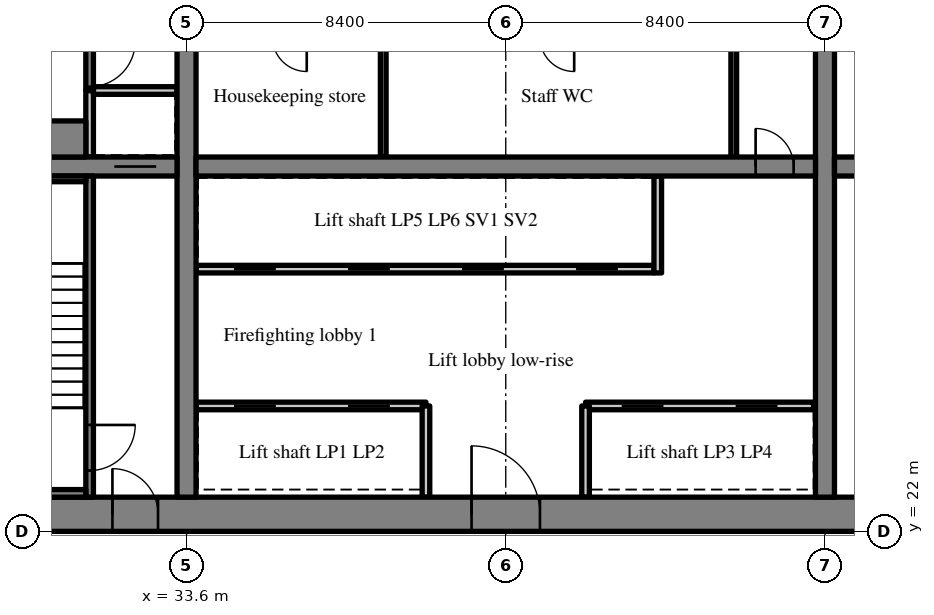
"""IFC4 building model, lengths in metres.
Left out: names, types, materials, properties, quantities, classifications, styles, units other than length and angle.
Written with IfcOpenShell. Run it as: python <this file> out.ifc"""

import sys

from ifc_helpers import new_model, si_unit, direction, frame, frame_2d, origin, place, context, subcontext, project, spatial, rectangle, extrude, source, transform, mapped, element, fill, save


model = new_model("IFC4")
c1 = context("Model", 3, precision=1e-05, world=origin(), true_north=direction((0.0, 1.0)))
c2 = subcontext(c1, "Body", "Model", "MODEL_VIEW")
j1 = project(units=[si_unit("LENGTHUNIT", "METRE"), si_unit("PLANEANGLEUNIT", "RADIAN")], contexts=[c1])
p1 = place(None, origin())
s1 = spatial("IfcSite", under=j1, at=p1, CompositionType="ELEMENT")
p2 = place(p1, origin())
s2 = spatial("IfcBuilding", under=s1, at=p2, CompositionType="ELEMENT")
p3 = place(p2, frame((0.0, 0.0, 91.4)))
s3 = spatial("IfcBuildingStorey", under=s2, at=p3, CompositionType="ELEMENT", Elevation=91.4)
m1 = source(origin(), c2, "Body", "SweptSolid", [
    extrude(rectangle(XDim=50.4, YDim=0.9, at=frame_2d((25.2, 0.0))), origin(), (0.0, 0.0, 1.0), 3.52),
])
p4 = place(p3, frame((25.2, 22.45, 0.0), z_axis=(0.0, 0.0, 1.0), x_axis=(1.0, 0.0, 0.0)))
e1 = element("IfcWall", 1, at=p4, inside=s3, PredefinedType="SHEAR", context=c2, shape_type="MappedRepresentation", body=[
    mapped(m1, transform((0.0, 0.0, 0.0), scale=1.0)),
])
m2 = source(origin(), c2, "Body", "SweptSolid", [
    extrude(rectangle(XDim=1.8, YDim=2.1, at=frame_2d((0.9, 1.05))), frame((0.0, 0.46, 0.0), z_axis=(0.0, -1.0, 0.0), x_axis=(1.0, 0.0, 0.0)), (0.0, 0.0, 1.0), 0.92),
])
p5 = place(p4, frame((15.9, 0.0, 0.0)))
e2 = element("IfcOpeningElement", 2, at=p5, cuts=e1, PredefinedType="OPENING", context=c2, shape_type="MappedRepresentation", body=[
    mapped(m2, transform((0.0, 0.0, 0.0), scale=1.0)),
])
m3 = source(origin(), c2, "Body", "SweptSolid", [
    extrude(rectangle(XDim=1.2, YDim=2.1, at=frame_2d((0.6, 1.05))), frame((0.0, 0.46, 0.0), z_axis=(0.0, -1.0, 0.0), x_axis=(1.0, 0.0, 0.0)), (0.0, 0.0, 1.0), 0.92),
])
p6 = place(p4, frame((26.975, 0.0, 0.0)))
e3 = element("IfcOpeningElement", 3, at=p6, cuts=e1, PredefinedType="OPENING", context=c2, shape_type="MappedRepresentation", body=[
    mapped(m3, transform((0.0, 0.0, 0.0), scale=1.0)),
])
m4 = source(origin(), c2, "Body", "SweptSolid", [
    extrude(rectangle(XDim=0.9, YDim=2.1, at=frame_2d((0.45, 1.05))), frame((0.0, 0.46, 0.0), z_axis=(0.0, -1.0, 0.0), x_axis=(1.0, 0.0, 0.0)), (0.0, 0.0, 1.0), 0.92),
])
p7 = place(p4, frame((34.5, 0.0, 0.0)))
e4 = element("IfcOpeningElement", 4, at=p7, cuts=e1, PredefinedType="OPENING", context=c2, shape_type="MappedRepresentation", body=[
    mapped(m4, transform((0.0, 0.0, 0.0), scale=1.0)),
])
p8 = place(p4, frame((31.5, 0.0, 0.0)))
e5 = element("IfcOpeningElement", 5, at=p8, cuts=e1, PredefinedType="OPENING", context=c2, shape_type="MappedRepresentation", body=[
    mapped(m4, transform((0.0, 0.0, 0.0), scale=1.0)),
])
p9 = place(p4, frame((39.788, 0.0, 0.0)))
e6 = element("IfcOpeningElement", 6, at=p9, cuts=e1, PredefinedType="OPENING", context=c2, shape_type="MappedRepresentation", body=[
    mapped(m4, transform((0.0, 0.0, 0.0), scale=1.0)),
])
p10 = place(p4, frame((36.762, 0.0, 0.0)))
e7 = element("IfcOpeningElement", 7, at=p10, cuts=e1, PredefinedType="OPENING", context=c2, shape_type="MappedRepresentation", body=[
    mapped(m4, transform((0.0, 0.0, 0.0), scale=1.0)),
])
p11 = place(p4, frame((6.45, 0.0, 0.0)))
e8 = element("IfcOpeningElement", 8, at=p11, cuts=e1, PredefinedType="OPENING", context=c2, shape_type="MappedRepresentation", body=[
    mapped(m3, transform((0.0, 0.0, 0.0), scale=1.0)),
])
p12 = place(p4, frame((47.775, 0.0, 0.0)))
e9 = element("IfcOpeningElement", 9, at=p12, cuts=e1, PredefinedType="OPENING", context=c2, shape_type="MappedRepresentation", body=[
    mapped(m3, transform((0.0, 0.0, 0.0), scale=1.0)),
])
m5 = source(origin(), c2, "Body", "SweptSolid", [
    extrude(rectangle(XDim=18.2, YDim=0.5, at=frame_2d((9.1, 0.0))), origin(), (0.0, 0.0, 1.0), 3.52),
])
p13 = place(p3, frame((33.6, 22.9, 0.0), z_axis=(0.0, 0.0, 1.0), x_axis=(0.0, 1.0, 0.0)))
e10 = element("IfcWall", 10, at=p13, inside=s3, PredefinedType="SHEAR", context=c2, shape_type="MappedRepresentation", body=[
    mapped(m5, transform((0.0, 0.0, 0.0), scale=1.0)),
])
m6 = source(origin(), c2, "Body", "SweptSolid", [
    extrude(rectangle(XDim=1.1, YDim=2.1, at=frame_2d((0.55, 1.05))), frame((0.0, 0.26, 0.0), z_axis=(0.0, -1.0, 0.0), x_axis=(1.0, 0.0, 0.0)), (0.0, 0.0, 1.0), 0.52),
])
p14 = place(p13, frame((12.55, 0.0, 0.0)))
e11 = element("IfcOpeningElement", 11, at=p14, cuts=e10, PredefinedType="OPENING", context=c2, shape_type="MappedRepresentation", body=[
    mapped(m6, transform((0.0, 0.0, 0.0), scale=1.0)),
])
p15 = place(p3, frame((50.4, 22.9, 0.0), z_axis=(0.0, 0.0, 1.0), x_axis=(0.0, 1.0, 0.0)))
e12 = element("IfcWall", 12, at=p15, inside=s3, PredefinedType="SHEAR", context=c2, shape_type="MappedRepresentation", body=[
    mapped(m5, transform((0.0, 0.0, 0.0), scale=1.0)),
])
p16 = place(p15, frame((12.55, 0.0, 0.0)))
e13 = element("IfcOpeningElement", 13, at=p16, cuts=e12, PredefinedType="OPENING", context=c2, shape_type="MappedRepresentation", body=[
    mapped(m6, transform((0.0, 0.0, 0.0), scale=1.0)),
])
m7 = source(origin(), c2, "Body", "SweptSolid", [
    extrude(rectangle(XDim=7.25, YDim=0.5, at=frame_2d((3.625, 0.0))), origin(), (0.0, 0.0, 1.0), 3.52),
])
p17 = place(p3, frame((26.1, 31.6, 0.0), z_axis=(0.0, 0.0, 1.0), x_axis=(1.0, 0.0, 0.0)))
e14 = element("IfcWall", 14, at=p17, inside=s3, PredefinedType="SHEAR", context=c2, shape_type="MappedRepresentation", body=[
    mapped(m7, transform((0.0, 0.0, 0.0), scale=1.0)),
])
p18 = place(p17, frame((5.6, 0.0, 0.0)))
e15 = element("IfcOpeningElement", 15, at=p18, cuts=e14, PredefinedType="OPENING", context=c2, shape_type="MappedRepresentation", body=[
    mapped(m6, transform((0.0, 0.0, 0.0), scale=1.0)),
])
m8 = source(origin(), c2, "Body", "SweptSolid", [
    extrude(rectangle(XDim=16.3, YDim=0.5, at=frame_2d((8.15, 0.0))), origin(), (0.0, 0.0, 1.0), 3.52),
])
p19 = place(p3, frame((33.85, 31.6, 0.0), z_axis=(0.0, 0.0, 1.0), x_axis=(1.0, 0.0, 0.0)))
e16 = element("IfcWall", 16, at=p19, inside=s3, PredefinedType="SHEAR", context=c2, shape_type="MappedRepresentation", body=[
    mapped(m8, transform((0.0, 0.0, 0.0), scale=1.0)),
])
m9 = source(origin(), c2, "Body", "SweptSolid", [
    extrude(rectangle(XDim=1.0, YDim=2.1, at=frame_2d((0.5, 1.05))), frame((0.0, 0.26, 0.0), z_axis=(0.0, -1.0, 0.0), x_axis=(1.0, 0.0, 0.0)), (0.0, 0.0, 1.0), 0.52),
])
p20 = place(p19, frame((14.725, 0.0, 0.0)))
e17 = element("IfcOpeningElement", 17, at=p20, cuts=e16, PredefinedType="OPENING", context=c2, shape_type="MappedRepresentation", body=[
    mapped(m9, transform((0.0, 0.0, 0.0), scale=1.0)),
])
m10 = source(origin(), c2, "Body", "SweptSolid", [
    extrude(rectangle(XDim=16.3, YDim=0.5, at=frame_2d((8.15, 0.0))), origin(), (0.0, 0.0, 1.0), 3.52),
])
p21 = place(p3, frame((50.65, 31.6, 0.0), z_axis=(0.0, 0.0, 1.0), x_axis=(1.0, 0.0, 0.0)))
e18 = element("IfcWall", 18, at=p21, inside=s3, PredefinedType="SHEAR", context=c2, shape_type="MappedRepresentation", body=[
    mapped(m10, transform((0.0, 0.0, 0.0), scale=1.0)),
])
p22 = place(p21, frame((0.575, 0.0, 0.0)))
e19 = element("IfcOpeningElement", 19, at=p22, cuts=e18, PredefinedType="OPENING", context=c2, shape_type="MappedRepresentation", body=[
    mapped(m9, transform((0.0, 0.0, 0.0), scale=1.0)),
])
m11 = source(origin(), c2, "Body", "SweptSolid", [
    extrude(rectangle(XDim=6.05, YDim=0.2, at=frame_2d((3.025, 0.0))), origin(), (0.0, 0.0, 1.0), 3.52),
])
p23 = place(p3, frame((33.85, 25.3, 0.0), z_axis=(0.0, 0.0, 1.0), x_axis=(1.0, 0.0, 0.0)))
e20 = element("IfcWall", 20, at=p23, inside=s3, PredefinedType="SOLIDWALL", context=c2, shape_type="MappedRepresentation", body=[
    mapped(m11, transform((0.0, 0.0, 0.0), scale=1.0)),
])
m12 = source(origin(), c2, "Body", "SweptSolid", [
    extrude(rectangle(XDim=1.1, YDim=2.1, at=frame_2d((0.55, 1.05))), frame((0.0, 0.11, 0.0), z_axis=(0.0, -1.0, 0.0), x_axis=(1.0, 0.0, 0.0)), (0.0, 0.0, 1.0), 0.22),
])
p24 = place(p23, frame((1.0, 0.0, 0.0)))
e21 = element("IfcOpeningElement", 21, at=p24, cuts=e20, PredefinedType="OPENING", context=c2, shape_type="MappedRepresentation", body=[
    mapped(m12, transform((0.0, 0.0, 0.0), scale=1.0)),
])
p25 = place(p23, frame((4.0, 0.0, 0.0)))
e22 = element("IfcOpeningElement", 22, at=p25, cuts=e20, PredefinedType="OPENING", context=c2, shape_type="MappedRepresentation", body=[
    mapped(m12, transform((0.0, 0.0, 0.0), scale=1.0)),
])
m13 = source(origin(), c2, "Body", "SweptSolid", [
    extrude(rectangle(XDim=6.0, YDim=0.2, at=frame_2d((3.0, 0.0))), origin(), (0.0, 0.0, 1.0), 3.52),
])
p26 = place(p3, frame((44.1, 25.3, 0.0), z_axis=(0.0, 0.0, 1.0), x_axis=(1.0, 0.0, 0.0)))
e23 = element("IfcWall", 23, at=p26, inside=s3, PredefinedType="SOLIDWALL", context=c2, shape_type="MappedRepresentation", body=[
    mapped(m13, transform((0.0, 0.0, 0.0), scale=1.0)),
])
p27 = place(p26, frame((0.95, 0.0, 0.0)))
e24 = element("IfcOpeningElement", 24, at=p27, cuts=e23, PredefinedType="OPENING", context=c2, shape_type="MappedRepresentation", body=[
    mapped(m12, transform((0.0, 0.0, 0.0), scale=1.0)),
])
p28 = place(p26, frame((3.95, 0.0, 0.0)))
e25 = element("IfcOpeningElement", 25, at=p28, cuts=e23, PredefinedType="OPENING", context=c2, shape_type="MappedRepresentation", body=[
    mapped(m12, transform((0.0, 0.0, 0.0), scale=1.0)),
])
m14 = source(origin(), c2, "Body", "SweptSolid", [
    extrude(rectangle(XDim=12.05, YDim=0.2, at=frame_2d((6.025, 0.0))), origin(), (0.0, 0.0, 1.0), 3.52),
])
p29 = place(p3, frame((33.85, 28.9, 0.0), z_axis=(0.0, 0.0, 1.0), x_axis=(1.0, 0.0, 0.0)))
e26 = element("IfcWall", 26, at=p29, inside=s3, PredefinedType="SOLIDWALL", context=c2, shape_type="MappedRepresentation", body=[
    mapped(m14, transform((0.0, 0.0, 0.0), scale=1.0)),
])
p30 = place(p29, frame((1.0, 0.0, 0.0)))
e27 = element("IfcOpeningElement", 27, at=p30, cuts=e26, PredefinedType="OPENING", context=c2, shape_type="MappedRepresentation", body=[
    mapped(m12, transform((0.0, 0.0, 0.0), scale=1.0)),
])
p31 = place(p29, frame((4.0, 0.0, 0.0)))
e28 = element("IfcOpeningElement", 28, at=p31, cuts=e26, PredefinedType="OPENING", context=c2, shape_type="MappedRepresentation", body=[
    mapped(m12, transform((0.0, 0.0, 0.0), scale=1.0)),
])
p32 = place(p29, frame((7.0, 0.0, 0.0)))
e29 = element("IfcOpeningElement", 29, at=p32, cuts=e26, PredefinedType="OPENING", context=c2, shape_type="MappedRepresentation", body=[
    mapped(m12, transform((0.0, 0.0, 0.0), scale=1.0)),
])
p33 = place(p29, frame((10.0, 0.0, 0.0)))
e30 = element("IfcOpeningElement", 30, at=p33, cuts=e26, PredefinedType="OPENING", context=c2, shape_type="MappedRepresentation", body=[
    mapped(m12, transform((0.0, 0.0, 0.0), scale=1.0)),
])
m15 = source(origin(), c2, "Body", "SweptSolid", [
    extrude(rectangle(XDim=2.4, YDim=0.2, at=frame_2d((1.2, 0.0))), origin(), (0.0, 0.0, 1.0), 3.52),
])
for number, where, z_axis, x_axis in (
    (31, (39.9, 22.9, 0.0), (0.0, 0.0, 1.0), (0.0, 1.0, 0.0)),
    (32, (44.1, 22.9, 0.0), (0.0, 0.0, 1.0), (0.0, 1.0, 0.0)),
):
    element("IfcWall", number, at=place(p3, frame(where, z_axis=z_axis, x_axis=x_axis)), inside=s3, PredefinedType="SOLIDWALL", context=c2, shape_type="MappedRepresentation", body=[
        mapped(m15, transform((0.0, 0.0, 0.0), scale=1.0)),
    ])
m16 = source(origin(), c2, "Body", "SweptSolid", [
    extrude(rectangle(XDim=2.55, YDim=0.2, at=frame_2d((1.275, 0.0))), origin(), (0.0, 0.0, 1.0), 3.52),
])
p34 = place(p3, frame((46.0, 28.8, 0.0), z_axis=(0.0, 0.0, 1.0), x_axis=(0.0, 1.0, 0.0)))
e33 = element("IfcWall", 33, at=p34, inside=s3, PredefinedType="SOLIDWALL", context=c2, shape_type="MappedRepresentation", body=[
    mapped(m16, transform((0.0, 0.0, 0.0), scale=1.0)),
])
m17 = source(origin(), c2, "Body", "SweptSolid", [
    extrude(rectangle(XDim=3.15, YDim=0.15, at=frame_2d((1.575, 0.0))), origin(), (0.0, 0.0, 1.0), 3.52),
])
for number, where, z_axis, x_axis in (
    (34, (48.0, 31.85, 0.0), (0.0, 0.0, 1.0), (0.0, 1.0, 0.0)),
    (35, (38.776, 31.85, 0.0), (0.0, 0.0, 1.0), (0.0, 1.0, 0.0)),
):
    element("IfcWall", number, at=place(p3, frame(where, z_axis=z_axis, x_axis=x_axis)), inside=s3, PredefinedType="PARTITIONING", context=c2, shape_type="MappedRepresentation", body=[
        mapped(m17, transform((0.0, 0.0, 0.0), scale=1.0)),
    ])
m18 = source(origin(), c2, "Body", "SweptSolid", [
    extrude(rectangle(XDim=8.45, YDim=0.2, at=frame_2d((4.225, 0.0))), origin(), (0.0, 0.0, 1.0), 3.52),
])
p35 = place(p3, frame((31.05, 22.9, 0.0), z_axis=(0.0, 0.0, 1.0), x_axis=(0.0, 1.0, 0.0)))
e36 = element("IfcWall", 36, at=p35, inside=s3, PredefinedType="SOLIDWALL", context=c2, shape_type="MappedRepresentation", body=[
    mapped(m18, transform((0.0, 0.0, 0.0), scale=1.0)),
])
m19 = source(origin(), c2, "Body", "SweptSolid", [
    extrude(rectangle(XDim=1.2, YDim=2.1, at=frame_2d((0.6, 1.05))), frame((0.0, 0.11, 0.0), z_axis=(0.0, -1.0, 0.0), x_axis=(1.0, 0.0, 0.0)), (0.0, 0.0, 1.0), 0.22),
])
p36 = place(p35, frame((0.7, 0.0, 0.0)))
e37 = element("IfcOpeningElement", 37, at=p36, cuts=e36, PredefinedType="OPENING", context=c2, shape_type="MappedRepresentation", body=[
    mapped(m19, transform((0.0, 0.0, 0.0), scale=1.0)),
])
m20 = source(origin(), c2, "Body", "SweptSolid", [
    extrude(rectangle(XDim=1.75, YDim=0.2, at=frame_2d((0.875, 0.0))), origin(), (0.0, 0.0, 1.0), 3.52),
])
p37 = place(p3, frame((31.05, 31.85, 0.0), z_axis=(0.0, 0.0, 1.0), x_axis=(0.0, 1.0, 0.0)))
e38 = element("IfcWall", 38, at=p37, inside=s3, PredefinedType="SOLIDWALL", context=c2, shape_type="MappedRepresentation", body=[
    mapped(m20, transform((0.0, 0.0, 0.0), scale=1.0)),
])
m21 = source(origin(), c2, "Body", "SweptSolid", [
    extrude(rectangle(XDim=2.2, YDim=0.2, at=frame_2d((1.1, 0.0))), origin(), (0.0, 0.0, 1.0), 3.52),
])
p38 = place(p3, frame((31.15, 33.6, 0.0), z_axis=(0.0, 0.0, 1.0), x_axis=(1.0, 0.0, 0.0)))
e39 = element("IfcWall", 39, at=p38, inside=s3, PredefinedType="SOLIDWALL", context=c2, shape_type="MappedRepresentation", body=[
    mapped(m21, transform((0.0, 0.0, 0.0), scale=1.0)),
])
m22 = source(origin(), c2, "Body", "SweptSolid", [
    extrude(rectangle(XDim=7.5, YDim=0.2, at=frame_2d((3.75, 0.0))), origin(), (0.0, 0.0, 1.0), 3.52),
])
p39 = place(p3, frame((31.05, 33.6, 0.0), z_axis=(0.0, 0.0, 1.0), x_axis=(0.0, 1.0, 0.0)))
e40 = element("IfcWall", 40, at=p39, inside=s3, PredefinedType="SOLIDWALL", context=c2, shape_type="MappedRepresentation", body=[
    mapped(m22, transform((0.0, 0.0, 0.0), scale=1.0)),
])
p40 = place(p39, frame((0.1, 0.0, 0.0)))
e41 = element("IfcOpeningElement", 41, at=p40, cuts=e40, PredefinedType="OPENING", context=c2, shape_type="MappedRepresentation", body=[
    mapped(m19, transform((0.0, 0.0, 0.0), scale=1.0)),
])
m23 = source(origin(), c2, "Body", "SweptSolid", [
    extrude(rectangle(XDim=4.85, YDim=0.2, at=frame_2d((2.425, 0.0))), origin(), (0.0, 0.0, 1.0), 3.52),
])
p41 = place(p3, frame((26.1, 23.0, 0.0), z_axis=(0.0, 0.0, 1.0), x_axis=(1.0, 0.0, 0.0)))
e42 = element("IfcWall", 42, at=p41, inside=s3, PredefinedType="SOLIDWALL", context=c2, shape_type="MappedRepresentation", body=[
    mapped(m23, transform((0.0, 0.0, 0.0), scale=1.0)),
])
m24 = source(origin(), c2, "Body", "SweptSolid", [
    extrude(rectangle(XDim=4.85, YDim=0.15, at=frame_2d((2.425, 0.0))), origin(), (0.0, 0.0, 1.0), 3.52),
])
p42 = place(p3, frame((26.1, 31.275, 0.0), z_axis=(0.0, 0.0, 1.0), x_axis=(1.0, 0.0, 0.0)))
e43 = element("IfcWall", 43, at=p42, inside=s3, PredefinedType="SOLIDWALL", context=c2, shape_type="MappedRepresentation", body=[
    mapped(m24, transform((0.0, 0.0, 0.0), scale=1.0)),
])
m25 = source(origin(), c2, "Body", "SweptSolid", [
    extrude(rectangle(XDim=4.85, YDim=0.95, at=frame_2d((2.425, 0.0))), origin(), (0.0, 0.0, 1.0), 3.52),
])
p43 = place(p3, frame((26.1, 32.325, 0.0), z_axis=(0.0, 0.0, 1.0), x_axis=(1.0, 0.0, 0.0)))
e44 = element("IfcWall", 44, at=p43, inside=s3, PredefinedType="SOLIDWALL", context=c2, shape_type="MappedRepresentation", body=[
    mapped(m25, transform((0.0, 0.0, 0.0), scale=1.0)),
])
m26 = source(origin(), c2, "Body", "SweptSolid", [
    extrude(rectangle(XDim=1.8, YDim=2.1, at=frame_2d((0.9, 1.05))), frame((0.0, 0.375, 0.0), z_axis=(0.0, -1.0, 0.0), x_axis=(1.0, 0.0, 0.0)), (0.0, 0.0, 1.0), 0.05),
])
p44 = place(p5, origin())
e45 = element("IfcDoor", 45, at=p44, inside=s3, OperationType="DOUBLE_DOOR_SINGLE_SWING", PredefinedType="DOOR", context=c2, shape_type="MappedRepresentation", body=[
    mapped(m26, transform((0.0, 0.0, 0.0), scale=1.0)),
])
fill(e2, e45)
m27 = source(origin(), c2, "Body", "SweptSolid", [
    extrude(rectangle(XDim=1.0, YDim=2.1, at=frame_2d((0.5, 1.05))), frame((0.0, 0.025, 0.0), z_axis=(0.0, -1.0, 0.0), x_axis=(1.0, 0.0, 0.0)), (0.0, 0.0, 1.0), 0.05),
])
p45 = place(p20, origin())
e46 = element("IfcDoor", 46, at=p45, inside=s3, OperationType="SINGLE_SWING_LEFT", PredefinedType="DOOR", context=c2, shape_type="MappedRepresentation", body=[
    mapped(m27, transform((0.0, 0.0, 0.0), scale=1.0)),
])
fill(e17, e46)
m28 = source(origin(), c2, "Body", "SweptSolid", [
    extrude(rectangle(XDim=1.1, YDim=2.1, at=frame_2d((0.55, 1.05))), frame((0.0, 0.025, 0.0), z_axis=(0.0, -1.0, 0.0), x_axis=(1.0, 0.0, 0.0)), (0.0, 0.0, 1.0), 0.05),
])
p46 = place(p24, origin())
e47 = element("IfcDoor", 47, at=p46, inside=s3, OperationType="SLIDING_TO_LEFT", PredefinedType="DOOR", context=c2, shape_type="MappedRepresentation", body=[
    mapped(m28, transform((0.0, 0.0, 0.0), scale=1.0)),
])
fill(e21, e47)
p47 = place(p25, origin())
e48 = element("IfcDoor", 48, at=p47, inside=s3, OperationType="SLIDING_TO_RIGHT", PredefinedType="DOOR", context=c2, shape_type="MappedRepresentation", body=[
    mapped(m28, transform((0.0, 0.0, 0.0), scale=1.0)),
])
fill(e22, e48)
p48 = place(p27, origin())
e49 = element("IfcDoor", 49, at=p48, inside=s3, OperationType="SLIDING_TO_LEFT", PredefinedType="DOOR", context=c2, shape_type="MappedRepresentation", body=[
    mapped(m28, transform((0.0, 0.0, 0.0), scale=1.0)),
])
fill(e24, e49)
p49 = place(p28, origin())
e50 = element("IfcDoor", 50, at=p49, inside=s3, OperationType="SLIDING_TO_RIGHT", PredefinedType="DOOR", context=c2, shape_type="MappedRepresentation", body=[
    mapped(m28, transform((0.0, 0.0, 0.0), scale=1.0)),
])
fill(e25, e50)
p50 = place(p30, origin())
e51 = element("IfcDoor", 51, at=p50, inside=s3, OperationType="SLIDING_TO_LEFT", PredefinedType="DOOR", context=c2, shape_type="MappedRepresentation", body=[
    mapped(m28, transform((0.0, 0.0, 0.0), scale=1.0)),
])
fill(e27, e51)
p51 = place(p31, origin())
e52 = element("IfcDoor", 52, at=p51, inside=s3, OperationType="SLIDING_TO_RIGHT", PredefinedType="DOOR", context=c2, shape_type="MappedRepresentation", body=[
    mapped(m28, transform((0.0, 0.0, 0.0), scale=1.0)),
])
fill(e28, e52)
p52 = place(p32, origin())
e53 = element("IfcDoor", 53, at=p52, inside=s3, OperationType="SLIDING_TO_LEFT", PredefinedType="DOOR", context=c2, shape_type="MappedRepresentation", body=[
    mapped(m28, transform((0.0, 0.0, 0.0), scale=1.0)),
])
fill(e29, e53)
p53 = place(p33, origin())
e54 = element("IfcDoor", 54, at=p53, inside=s3, OperationType="SLIDING_TO_RIGHT", PredefinedType="DOOR", context=c2, shape_type="MappedRepresentation", body=[
    mapped(m28, transform((0.0, 0.0, 0.0), scale=1.0)),
])
fill(e30, e54)
m29 = source(origin(), c2, "Body", "SweptSolid", [
    extrude(rectangle(XDim=1.2, YDim=2.1, at=frame_2d((0.6, 1.05))), frame((0.0, 0.025, 0.0), z_axis=(0.0, -1.0, 0.0), x_axis=(1.0, 0.0, 0.0)), (0.0, 0.0, 1.0), 0.05),
])
p54 = place(p36, origin())
e55 = element("IfcDoor", 55, at=p54, inside=s3, OperationType="SINGLE_SWING_RIGHT", PredefinedType="DOOR", context=c2, shape_type="MappedRepresentation", body=[
    mapped(m29, transform((0.0, 0.0, 0.0), scale=1.0)),
])
fill(e37, e55)
m30 = source(origin(), c2, "Body", "SweptSolid", [
    extrude(rectangle(XDim=1.2, YDim=2.1, at=frame_2d((0.6, 1.05))), frame((0.0, 0.375, 0.0), z_axis=(0.0, -1.0, 0.0), x_axis=(1.0, 0.0, 0.0)), (0.0, 0.0, 1.0), 0.05),
])
p55 = place(p11, origin())
e56 = element("IfcDoor", 56, at=p55, inside=s3, OperationType="SINGLE_SWING_LEFT", PredefinedType="DOOR", context=c2, shape_type="MappedRepresentation", body=[
    mapped(m30, transform((0.0, 0.0, 0.0), scale=1.0)),
])
fill(e8, e56)
p56 = place(p18, origin())
e57 = element("IfcDoor", 57, at=p56, inside=s3, OperationType="SLIDING_TO_RIGHT", PredefinedType="DOOR", context=c2, shape_type="MappedRepresentation", body=[
    mapped(m28, transform((0.0, 0.0, 0.0), scale=1.0)),
])
fill(e15, e57)
p57 = place(p40, origin())
e58 = element("IfcDoor", 58, at=p57, inside=s3, OperationType="SINGLE_SWING_RIGHT", PredefinedType="DOOR", context=c2, shape_type="MappedRepresentation", body=[
    mapped(m29, transform((0.0, 0.0, 0.0), scale=1.0)),
])
fill(e41, e58)
save(model, sys.argv[1])
